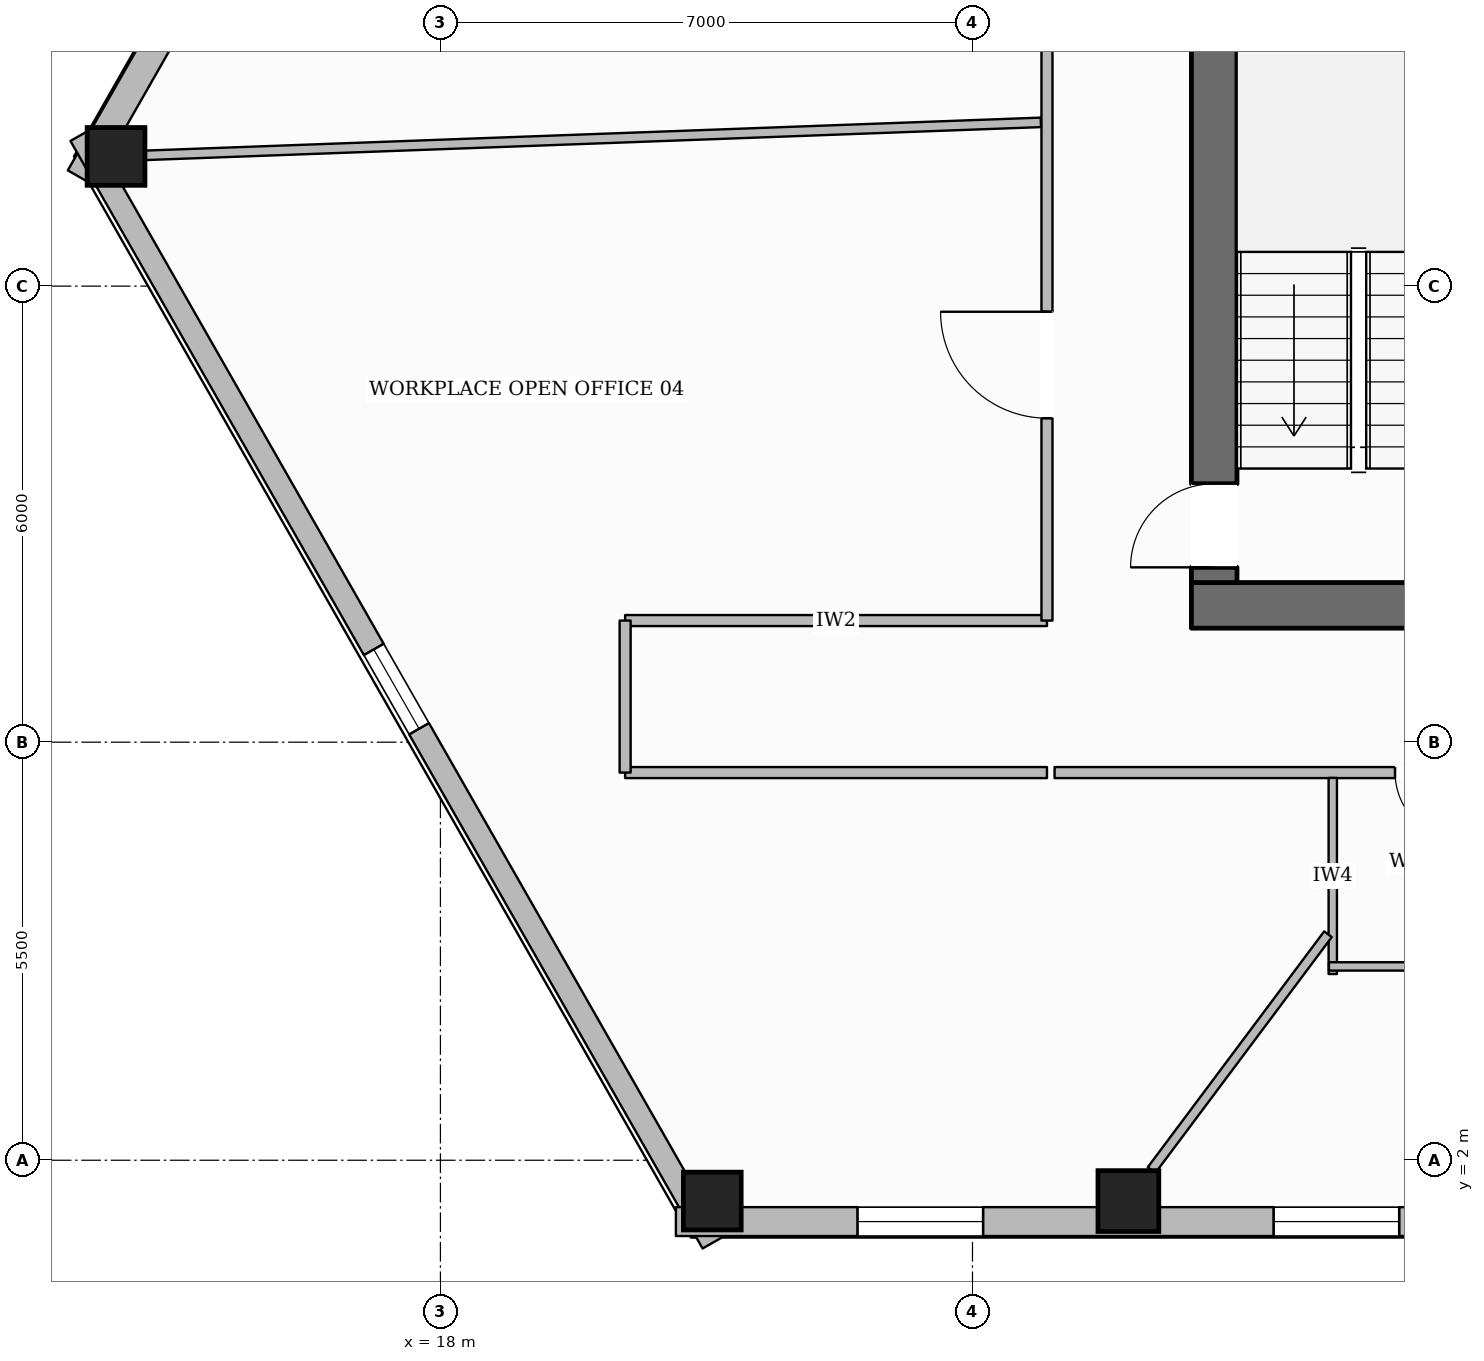
"""IFC4 building model, lengths in metres.
Left out: names, types, materials, properties, quantities, classifications, styles, units other than length and angle.
Written with IfcOpenShell. Run it as: python <this file> out.ifc"""

import sys

from ifc_helpers import new_model, si_unit, direction, frame, frame_2d, origin, origin_2d, place, context, subcontext, project, spatial, rectangle, hollow_rectangle, extrude, element, fill, save


model = new_model("IFC4")
c1 = context("Model", 3, precision=1e-05, world=origin(), true_north=direction((0.0, 1.0)))
c2 = subcontext(c1, "Body", "Model", "MODEL_VIEW")
j1 = project(units=[si_unit("LENGTHUNIT", "METRE"), si_unit("PLANEANGLEUNIT", "RADIAN")], contexts=[c1])
p1 = place(None, origin())
s1 = spatial("IfcSite", under=j1, at=p1, CompositionType="ELEMENT")
p2 = place(p1, origin())
s2 = spatial("IfcBuilding", under=s1, at=p2, CompositionType="ELEMENT")
p3 = place(p2, frame((0.0, 0.0, 29.1)))
s3 = spatial("IfcBuildingStorey", under=s2, at=p3, CompositionType="ELEMENT", Elevation=29.1)
p4 = place(p3, frame((27.88, 9.3, 0.0), z_axis=(0.0, 0.0, 1.0), x_axis=(1.0, 0.0, 0.0)))
e1 = element("IfcWall", 1, at=p4, inside=s3, PredefinedType="SOLIDWALL", context=c2, shape_type="SweptSolid", body=[
    extrude(rectangle(XDim=20.24, YDim=0.6, at=frame_2d((10.12, 0.0))), origin(), (0.0, 0.0, 1.0), 3.59),
])
p5 = place(p4, frame((10.62, 0.0, 0.0)))
e2 = element("IfcOpeningElement", 2, at=p5, cuts=e1, PredefinedType="OPENING", context=c2, shape_type="SweptSolid", body=[
    extrude(rectangle(XDim=1.4, YDim=2.2, at=frame_2d((0.7, 1.1))), frame((0.0, 0.31, 0.0), z_axis=(0.0, -1.0, 0.0), x_axis=(1.0, 0.0, 0.0)), (0.0, 0.0, 1.0), 0.62),
])
p6 = place(p3, frame((28.18, 9.6, 0.0), z_axis=(0.0, 0.0, 1.0), x_axis=(0.0, 1.0, 0.0)))
e3 = element("IfcWall", 3, at=p6, inside=s3, PredefinedType="SOLIDWALL", context=c2, shape_type="SweptSolid", body=[
    extrude(rectangle(XDim=13.0, YDim=0.6, at=frame_2d((6.5, 0.0))), origin(), (0.0, 0.0, 1.0), 3.59),
])
p7 = place(p6, frame((0.2, 0.0, 0.0)))
e4 = element("IfcOpeningElement", 4, at=p7, cuts=e3, PredefinedType="OPENING", context=c2, shape_type="SweptSolid", body=[
    extrude(rectangle(XDim=1.1, YDim=2.15, at=frame_2d((0.55, 1.075))), frame((0.0, 0.31, 0.0), z_axis=(0.0, -1.0, 0.0), x_axis=(1.0, 0.0, 0.0)), (0.0, 0.0, 1.0), 0.62),
])
p8 = place(p6, frame((8.4, 0.0, 0.0)))
e5 = element("IfcOpeningElement", 5, at=p8, cuts=e3, PredefinedType="OPENING", context=c2, shape_type="SweptSolid", body=[
    extrude(rectangle(XDim=0.9, YDim=2.1, at=frame_2d((0.45, 1.05))), frame((0.0, 0.31, 0.0), z_axis=(0.0, -1.0, 0.0), x_axis=(1.0, 0.0, 0.0)), (0.0, 0.0, 1.0), 0.62),
])
for number, where, z_axis, x_axis in (
    (6, (13.733, 15.206, 0.0), (0.0, 0.0, 1.0), (1.0, 0.0, 0.0)),
    (7, (21.577, 1.463, 0.0), (0.0, 0.0, 1.0), (1.0, 0.0, 0.0)),
):
    element("IfcColumn", number, at=place(p3, frame(where, z_axis=z_axis, x_axis=x_axis)), inside=s3, PredefinedType="COLUMN", context=c2, shape_type="SweptSolid", body=[
        extrude(hollow_rectangle(XDim=0.76, YDim=0.76, WallThickness=0.035, at=origin_2d()), origin(), (0.0, 0.0, 1.0), 3.59),
    ])
p9 = place(p3, frame((27.051, 1.463, 0.0), z_axis=(0.0, 0.0, 1.0), x_axis=(1.0, 0.0, 0.0)))
e8 = element("IfcColumn", 8, at=p9, inside=s3, PredefinedType="COLUMN", context=c2, shape_type="SweptSolid", body=[
    extrude(hollow_rectangle(XDim=0.8, YDim=0.8, WallThickness=0.036, at=origin_2d()), origin(), (0.0, 0.0, 1.0), 3.59),
])
p10 = place(p3, frame((13.263, 14.928, 0.0), z_axis=(0.0, 0.0, 1.0), x_axis=(0.495711630902, 0.868487178367, 0.0)))
e9 = element("IfcWall", 9, at=p10, inside=s3, PredefinedType="STANDARD", context=c2, shape_type="SweptSolid", body=[
    extrude(rectangle(XDim=34.092, YDim=0.38, at=frame_2d((17.046, 0.0))), origin(), (0.0, 0.0, 1.0), 2.97),
])
p11 = place(p10, frame((30.027, 0.0, 0.65)))
e10 = element("IfcOpeningElement", 10, at=p11, cuts=e9, PredefinedType="OPENING", context=c2, shape_type="SweptSolid", body=[
    extrude(rectangle(XDim=1.65, YDim=1.75, at=frame_2d((0.825, 0.875))), frame((0.0, 0.2, 0.0), z_axis=(0.0, -1.0, 0.0), x_axis=(1.0, 0.0, 0.0)), (0.0, 0.0, 1.0), 0.4),
])
p12 = place(p10, frame((24.504, 0.0, 0.65)))
e11 = element("IfcOpeningElement", 11, at=p12, cuts=e9, PredefinedType="OPENING", context=c2, shape_type="SweptSolid", body=[
    extrude(rectangle(XDim=1.65, YDim=1.75, at=frame_2d((0.825, 0.875))), frame((0.0, 0.2, 0.0), z_axis=(0.0, -1.0, 0.0), x_axis=(1.0, 0.0, 0.0)), (0.0, 0.0, 1.0), 0.4),
])
p13 = place(p10, frame((13.457, 0.0, 0.65)))
e12 = element("IfcOpeningElement", 12, at=p13, cuts=e9, PredefinedType="OPENING", context=c2, shape_type="SweptSolid", body=[
    extrude(rectangle(XDim=1.65, YDim=1.75, at=frame_2d((0.825, 0.875))), frame((0.0, 0.2, 0.0), z_axis=(0.0, -1.0, 0.0), x_axis=(1.0, 0.0, 0.0)), (0.0, 0.0, 1.0), 0.4),
])
p14 = place(p10, frame((7.934, 0.0, 0.65)))
e13 = element("IfcOpeningElement", 13, at=p14, cuts=e9, PredefinedType="OPENING", context=c2, shape_type="SweptSolid", body=[
    extrude(rectangle(XDim=1.65, YDim=1.75, at=frame_2d((0.825, 0.875))), frame((0.0, 0.2, 0.0), z_axis=(0.0, -1.0, 0.0), x_axis=(1.0, 0.0, 0.0)), (0.0, 0.0, 1.0), 0.4),
])
p15 = place(p10, frame((2.411, 0.0, 0.65)))
e14 = element("IfcOpeningElement", 14, at=p15, cuts=e9, PredefinedType="OPENING", context=c2, shape_type="SweptSolid", body=[
    extrude(rectangle(XDim=1.65, YDim=1.75, at=frame_2d((0.825, 0.875))), frame((0.0, 0.2, 0.0), z_axis=(0.0, -1.0, 0.0), x_axis=(1.0, 0.0, 0.0)), (0.0, 0.0, 1.0), 0.4),
])
p16 = place(p3, frame((21.58, 0.913, 0.0), z_axis=(0.0, 0.0, 1.0), x_axis=(-0.495706340457, 0.868490198005, 0.0)))
e15 = element("IfcWall", 15, at=p16, inside=s3, PredefinedType="STANDARD", context=c2, shape_type="SweptSolid", body=[
    extrude(rectangle(XDim=16.777, YDim=0.3, at=frame_2d((8.388, 0.0))), origin(), (0.0, 0.0, 1.0), 2.97),
])
p17 = place(p16, frame((7.789, 0.0, 0.65)))
e16 = element("IfcOpeningElement", 16, at=p17, cuts=e15, PredefinedType="OPENING", context=c2, shape_type="SweptSolid", body=[
    extrude(rectangle(XDim=1.2, YDim=1.7, at=frame_2d((0.6, 0.85))), frame((0.0, 0.16, 0.0), z_axis=(0.0, -1.0, 0.0), x_axis=(1.0, 0.0, 0.0)), (0.0, 0.0, 1.0), 0.32),
])
p18 = place(p3, frame((54.902, 1.193, 0.0), z_axis=(0.0, 0.0, 1.0), x_axis=(-1.0, 0.0, 0.0)))
e17 = element("IfcWall", 17, at=p18, inside=s3, PredefinedType="STANDARD", context=c2, shape_type="SweptSolid", body=[
    extrude(rectangle(XDim=33.804, YDim=0.38, at=frame_2d((16.902, 0.0))), origin(), (0.0, 0.0, 1.0), 2.97),
])
p19 = place(p18, frame((29.763, 0.0, 0.65)))
e18 = element("IfcOpeningElement", 18, at=p19, cuts=e17, PredefinedType="OPENING", context=c2, shape_type="SweptSolid", body=[
    extrude(rectangle(XDim=1.65, YDim=1.75, at=frame_2d((0.825, 0.875))), frame((0.0, 0.2, 0.0), z_axis=(0.0, -1.0, 0.0), x_axis=(1.0, 0.0, 0.0)), (0.0, 0.0, 1.0), 0.4),
])
p20 = place(p18, frame((24.288, 0.0, 0.65)))
e19 = element("IfcOpeningElement", 19, at=p20, cuts=e17, PredefinedType="OPENING", context=c2, shape_type="SweptSolid", body=[
    extrude(rectangle(XDim=1.65, YDim=1.75, at=frame_2d((0.825, 0.875))), frame((0.0, 0.2, 0.0), z_axis=(0.0, -1.0, 0.0), x_axis=(1.0, 0.0, 0.0)), (0.0, 0.0, 1.0), 0.4),
])
p21 = place(p18, frame((13.34, 0.0, 0.65)))
e20 = element("IfcOpeningElement", 20, at=p21, cuts=e17, PredefinedType="OPENING", context=c2, shape_type="SweptSolid", body=[
    extrude(rectangle(XDim=1.65, YDim=1.75, at=frame_2d((0.825, 0.875))), frame((0.0, 0.2, 0.0), z_axis=(0.0, -1.0, 0.0), x_axis=(1.0, 0.0, 0.0)), (0.0, 0.0, 1.0), 0.4),
])
p22 = place(p18, frame((7.865, 0.0, 0.65)))
e21 = element("IfcOpeningElement", 21, at=p22, cuts=e17, PredefinedType="OPENING", context=c2, shape_type="SweptSolid", body=[
    extrude(rectangle(XDim=1.65, YDim=1.75, at=frame_2d((0.825, 0.875))), frame((0.0, 0.2, 0.0), z_axis=(0.0, -1.0, 0.0), x_axis=(1.0, 0.0, 0.0)), (0.0, 0.0, 1.0), 0.4),
])
p23 = place(p18, frame((2.391, 0.0, 0.65)))
e22 = element("IfcOpeningElement", 22, at=p23, cuts=e17, PredefinedType="OPENING", context=c2, shape_type="SweptSolid", body=[
    extrude(rectangle(XDim=1.65, YDim=1.75, at=frame_2d((0.825, 0.875))), frame((0.0, 0.2, 0.0), z_axis=(0.0, -1.0, 0.0), x_axis=(1.0, 0.0, 0.0)), (0.0, 0.0, 1.0), 0.4),
])
p24 = place(p3, frame((20.43, 9.1, 0.0), z_axis=(0.0, 0.0, 1.0), x_axis=(1.0, 0.0, 0.0)))
e23 = element("IfcWall", 23, at=p24, inside=s3, PredefinedType="PARTITIONING", context=c2, shape_type="SweptSolid", body=[
    extrude(rectangle(XDim=5.55, YDim=0.145, at=frame_2d((2.775, 0.0))), origin(), (0.0, 0.0, 1.0), 3.59),
])
p25 = place(p3, frame((25.98, 9.1, 0.0), z_axis=(0.0, 0.0, 1.0), x_axis=(0.0, 1.0, 0.0)))
e24 = element("IfcWall", 24, at=p25, inside=s3, PredefinedType="PARTITIONING", context=c2, shape_type="SweptSolid", body=[
    extrude(rectangle(XDim=16.0, YDim=0.145, at=frame_2d((8.0, 0.0))), origin(), (0.0, 0.0, 1.0), 3.278),
])
p26 = place(p25, frame((10.491, 0.0, 0.0)))
e25 = element("IfcOpeningElement", 25, at=p26, cuts=e24, PredefinedType="OPENING", context=c2, shape_type="SweptSolid", body=[
    extrude(rectangle(XDim=1.4, YDim=2.2, at=frame_2d((0.7, 1.1))), frame((0.0, 0.083, 0.0), z_axis=(0.0, -1.0, 0.0), x_axis=(1.0, 0.0, 0.0)), (0.0, 0.0, 1.0), 0.165),
])
p27 = place(p25, frame((2.663, 0.0, 0.0)))
e26 = element("IfcOpeningElement", 26, at=p27, cuts=e24, PredefinedType="OPENING", context=c2, shape_type="SweptSolid", body=[
    extrude(rectangle(XDim=1.4, YDim=2.2, at=frame_2d((0.7, 1.1))), frame((0.0, 0.083, 0.0), z_axis=(0.0, -1.0, 0.0), x_axis=(1.0, 0.0, 0.0)), (0.0, 0.0, 1.0), 0.165),
])
p28 = place(p3, frame((49.92, 7.1, 0.0), z_axis=(0.0, 0.0, 1.0), x_axis=(-1.0, 0.0, 0.0)))
e27 = element("IfcWall", 27, at=p28, inside=s3, PredefinedType="PARTITIONING", context=c2, shape_type="SweptSolid", body=[
    extrude(rectangle(XDim=23.84, YDim=0.145, at=frame_2d((11.92, 0.0))), origin(), (0.0, 0.0, 1.0), 3.278),
])
p29 = place(p28, frame((18.48, 0.0, 0.0)))
e28 = element("IfcOpeningElement", 28, at=p29, cuts=e27, PredefinedType="OPENING", context=c2, shape_type="SweptSolid", body=[
    extrude(rectangle(XDim=0.88, YDim=2.1, at=frame_2d((0.44, 1.05))), frame((0.0, 0.083, 0.0), z_axis=(0.0, -1.0, 0.0), x_axis=(1.0, 0.0, 0.0)), (0.0, 0.0, 1.0), 0.165),
])
p30 = place(p28, frame((15.96, 0.0, 0.0)))
e29 = element("IfcOpeningElement", 29, at=p30, cuts=e27, PredefinedType="OPENING", context=c2, shape_type="SweptSolid", body=[
    extrude(rectangle(XDim=0.88, YDim=2.1, at=frame_2d((0.44, 1.05))), frame((0.0, 0.083, 0.0), z_axis=(0.0, -1.0, 0.0), x_axis=(1.0, 0.0, 0.0)), (0.0, 0.0, 1.0), 0.165),
])
p31 = place(p28, frame((13.5, 0.0, 0.0)))
e30 = element("IfcOpeningElement", 30, at=p31, cuts=e27, PredefinedType="OPENING", context=c2, shape_type="SweptSolid", body=[
    extrude(rectangle(XDim=0.96, YDim=2.1, at=frame_2d((0.48, 1.05))), frame((0.0, 0.083, 0.0), z_axis=(0.0, -1.0, 0.0), x_axis=(1.0, 0.0, 0.0)), (0.0, 0.0, 1.0), 0.165),
])
p32 = place(p28, frame((8.311, 0.0, 0.0)))
e31 = element("IfcOpeningElement", 31, at=p32, cuts=e27, PredefinedType="OPENING", context=c2, shape_type="SweptSolid", body=[
    extrude(rectangle(XDim=1.4, YDim=2.2, at=frame_2d((0.7, 1.1))), frame((0.0, 0.083, 0.0), z_axis=(0.0, -1.0, 0.0), x_axis=(1.0, 0.0, 0.0)), (0.0, 0.0, 1.0), 0.165),
])
p33 = place(p3, frame((25.98, 7.1, 0.0), z_axis=(0.0, 0.0, 1.0), x_axis=(-1.0, 0.0, 0.0)))
e32 = element("IfcWall", 32, at=p33, inside=s3, PredefinedType="PARTITIONING", context=c2, shape_type="SweptSolid", body=[
    extrude(rectangle(XDim=5.55, YDim=0.145, at=frame_2d((2.775, 0.0))), origin(), (0.0, 0.0, 1.0), 3.59),
])
p34 = place(p3, frame((20.43, 7.1, 0.0), z_axis=(0.0, 0.0, 1.0), x_axis=(0.0, 1.0, 0.0)))
e33 = element("IfcWall", 33, at=p34, inside=s3, PredefinedType="PARTITIONING", context=c2, shape_type="SweptSolid", body=[
    extrude(rectangle(XDim=2.0, YDim=0.145, at=frame_2d((1.0, 0.0))), origin(), (0.0, 0.0, 1.0), 3.59),
])
p35 = place(p3, frame((29.74, 4.45, 0.0), z_axis=(0.0, 0.0, 1.0), x_axis=(0.0, 1.0, 0.0)))
e34 = element("IfcWall", 34, at=p35, inside=s3, PredefinedType="PLUMBINGWALL", context=c2, shape_type="SweptSolid", body=[
    extrude(rectangle(XDim=2.58, YDim=0.11, at=frame_2d((1.29, 0.0))), origin(), (0.0, 0.0, 1.0), 3.59),
])
p36 = place(p3, frame((29.69, 4.55, 0.0), z_axis=(0.0, 0.0, 1.0), x_axis=(1.0, 0.0, 0.0)))
e35 = element("IfcWall", 35, at=p36, inside=s3, PredefinedType="PLUMBINGWALL", context=c2, shape_type="SweptSolid", body=[
    extrude(rectangle(XDim=7.46, YDim=0.11, at=frame_2d((3.73, 0.0))), origin(), (0.0, 0.0, 1.0), 3.59),
])
p37 = place(p3, frame((25.899, 15.654, 0.0), z_axis=(0.0, 0.0, 1.0), x_axis=(-0.999322388706, -0.036807111154, 0.0)))
e36 = element("IfcWall", 36, at=p37, inside=s3, PredefinedType="PARTITIONING", context=c2, shape_type="SweptSolid", body=[
    extrude(rectangle(XDim=11.787, YDim=0.125, at=frame_2d((5.894, 0.0))), origin(), (0.0, 0.0, 1.0), 3.057),
])
p38 = place(p3, frame((29.677, 4.973, 0.0), z_axis=(0.0, 0.0, 1.0), x_axis=(-0.598981151393, -0.800763123699, 0.0)))
e37 = element("IfcWall", 37, at=p38, inside=s3, PredefinedType="PARTITIONING", context=c2, shape_type="SweptSolid", body=[
    extrude(rectangle(XDim=3.874, YDim=0.125, at=frame_2d((1.937, 0.0))), origin(), (0.0, 0.0, 1.0), 3.59),
])
p39 = place(p19, origin())
e38 = element("IfcWindow", 38, at=p39, inside=s3, PartitioningType="SINGLE_PANEL", PredefinedType="WINDOW", context=c2, shape_type="SweptSolid", body=[
    extrude(rectangle(XDim=1.65, YDim=1.75, at=frame_2d((0.825, 0.875))), frame((0.0, 0.03, 0.0), z_axis=(0.0, -1.0, 0.0), x_axis=(1.0, 0.0, 0.0)), (0.0, 0.0, 1.0), 0.06),
])
fill(e18, e38)
p40 = place(p20, origin())
e39 = element("IfcWindow", 39, at=p40, inside=s3, PartitioningType="SINGLE_PANEL", PredefinedType="WINDOW", context=c2, shape_type="SweptSolid", body=[
    extrude(rectangle(XDim=1.65, YDim=1.75, at=frame_2d((0.825, 0.875))), frame((0.0, 0.03, 0.0), z_axis=(0.0, -1.0, 0.0), x_axis=(1.0, 0.0, 0.0)), (0.0, 0.0, 1.0), 0.06),
])
fill(e19, e39)
p41 = place(p17, origin())
e40 = element("IfcWindow", 40, at=p41, inside=s3, PartitioningType="SINGLE_PANEL", PredefinedType="WINDOW", context=c2, shape_type="SweptSolid", body=[
    extrude(rectangle(XDim=1.2, YDim=1.7, at=frame_2d((0.6, 0.85))), frame((0.0, 0.03, 0.0), z_axis=(0.0, -1.0, 0.0), x_axis=(1.0, 0.0, 0.0)), (0.0, 0.0, 1.0), 0.06),
])
fill(e16, e40)
p42 = place(p7, origin())
e41 = element("IfcDoor", 41, at=p42, inside=s3, OperationType="SINGLE_SWING_LEFT", PredefinedType="DOOR", context=c2, shape_type="SweptSolid", body=[
    extrude(rectangle(XDim=1.1, YDim=2.15, at=frame_2d((0.55, 1.075))), frame((0.0, 0.025, 0.0), z_axis=(0.0, -1.0, 0.0), x_axis=(1.0, 0.0, 0.0)), (0.0, 0.0, 1.0), 0.05),
])
fill(e4, e41)
p43 = place(p29, origin())
e42 = element("IfcDoor", 42, at=p43, inside=s3, OperationType="SINGLE_SWING_LEFT", PredefinedType="DOOR", context=c2, shape_type="SweptSolid", body=[
    extrude(rectangle(XDim=0.88, YDim=2.1, at=frame_2d((0.44, 1.05))), frame((0.0, 0.025, 0.0), z_axis=(0.0, -1.0, 0.0), x_axis=(1.0, 0.0, 0.0)), (0.0, 0.0, 1.0), 0.05),
])
fill(e28, e42)
p44 = place(p27, origin())
e43 = element("IfcDoor", 43, at=p44, inside=s3, OperationType="SINGLE_SWING_RIGHT", PredefinedType="DOOR", context=c2, shape_type="SweptSolid", body=[
    extrude(rectangle(XDim=1.4, YDim=2.2, at=frame_2d((0.7, 1.1))), frame((0.0, 0.025, 0.0), z_axis=(0.0, -1.0, 0.0), x_axis=(1.0, 0.0, 0.0)), (0.0, 0.0, 1.0), 0.05),
])
fill(e26, e43)
save(model, sys.argv[1])
